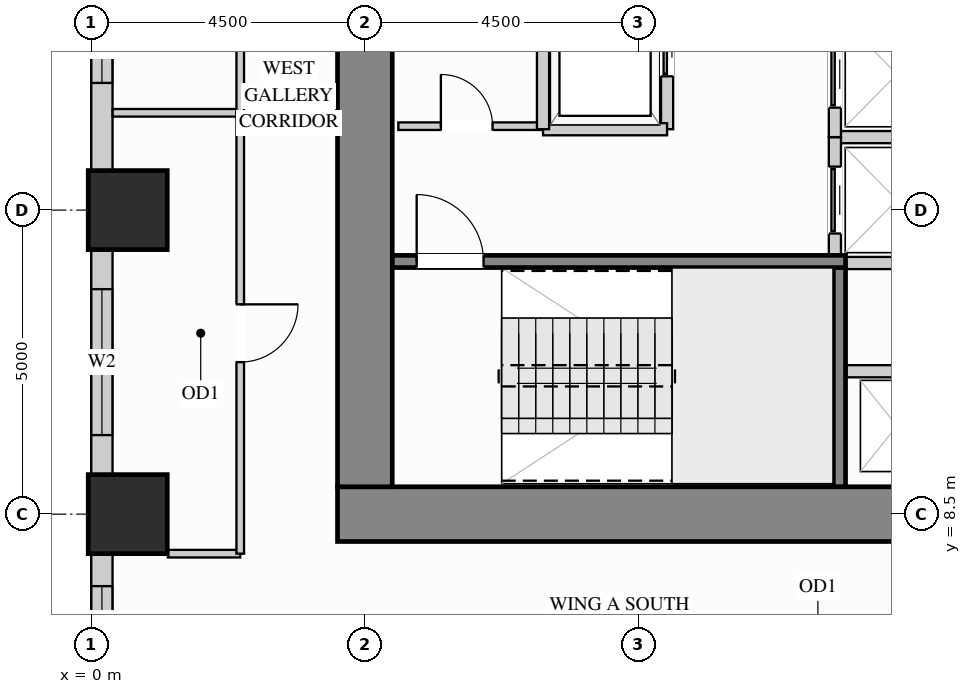
"""IFC4 building model, lengths in metres.
Left out: names, types, materials, properties, quantities, classifications, styles, units other than length and angle.
Written with IfcOpenShell. Run it as: python <this file> out.ifc"""

import sys

from ifc_helpers import new_model, si_unit, direction, frame, frame_2d, origin, origin_2d, place, context, subcontext, project, spatial, rectangle, extrude, source, transform, mapped, element, fill, save


model = new_model("IFC4")
c1 = context("Model", 3, precision=1e-05, world=origin(), true_north=direction((0.0, 1.0)))
c2 = subcontext(c1, "Body", "Model", "MODEL_VIEW")
j1 = project(units=[si_unit("LENGTHUNIT", "METRE"), si_unit("PLANEANGLEUNIT", "RADIAN")], contexts=[c1])
p1 = place(None, origin())
s1 = spatial("IfcSite", under=j1, at=p1, CompositionType="ELEMENT")
p2 = place(p1, origin())
s2 = spatial("IfcBuilding", under=s1, at=p2, CompositionType="ELEMENT")
p3 = place(p2, frame((0.0, 0.0, 58.5)))
s3 = spatial("IfcBuildingStorey", under=s2, at=p3, CompositionType="ELEMENT", Elevation=58.5)
m1 = source(origin(), c2, "Body", "SweptSolid", [
    extrude(rectangle(XDim=1.3, YDim=1.3, at=origin_2d()), origin(), (0.0, 0.0, 1.0), 3.38),
])
for number, where, z_axis, x_axis in (
    (1, (0.6, 13.5, 0.0), (0.0, 0.0, 1.0), (1.0, 0.0, 0.0)),
    (2, (0.6, 8.5, 0.0), (0.0, 0.0, 1.0), (1.0, 0.0, 0.0)),
):
    element("IfcColumn", number, at=place(p3, frame(where, z_axis=z_axis, x_axis=x_axis)), inside=s3, PredefinedType="COLUMN", context=c2, shape_type="MappedRepresentation", body=[
        mapped(m1, transform((0.0, 0.0, 0.0), x_axis=(1.0, 0.0, 0.0), y_axis=(0.0, 1.0, 0.0), z_axis=(0.0, 0.0, 1.0))),
    ])
m2 = source(origin(), c2, "Body", "SweptSolid", [
    extrude(rectangle(XDim=10.9, YDim=0.9, at=frame_2d((5.45, 0.0))), origin(), (0.0, 0.0, 1.0), 3.38),
])
p4 = place(p3, frame((4.05, 8.5, 0.0), z_axis=(0.0, 0.0, 1.0), x_axis=(1.0, 0.0, 0.0)))
e3 = element("IfcWall", 3, at=p4, inside=s3, PredefinedType="SHEAR", context=c2, shape_type="MappedRepresentation", body=[
    mapped(m2, transform((0.0, 0.0, 0.0), x_axis=(1.0, 0.0, 0.0), y_axis=(0.0, 1.0, 0.0), z_axis=(0.0, 0.0, 1.0))),
])
m3 = source(origin(), c2, "Body", "SweptSolid", [
    extrude(rectangle(XDim=20.1, YDim=0.9, at=frame_2d((10.05, 0.0))), origin(), (0.0, 0.0, 1.0), 3.38),
])
p5 = place(p3, frame((4.5, 8.95, 0.0), z_axis=(0.0, 0.0, 1.0), x_axis=(0.0, 1.0, 0.0)))
e4 = element("IfcWall", 4, at=p5, inside=s3, PredefinedType="SHEAR", context=c2, shape_type="MappedRepresentation", body=[
    mapped(m3, transform((0.0, 0.0, 0.0), x_axis=(1.0, 0.0, 0.0), y_axis=(0.0, 1.0, 0.0), z_axis=(0.0, 0.0, 1.0))),
])
p6 = place(p3, frame((0.175, 17.352, 0.0), z_axis=(0.0, 0.0, 1.0), x_axis=(0.0, -1.0, 0.0)))
e5 = element("IfcWall", 5, at=p6, inside=s3, PredefinedType="SOLIDWALL", context=c2, shape_type="SweptSolid", body=[
    extrude(rectangle(XDim=3.204, YDim=0.35, at=frame_2d((1.602, 0.0))), origin(), (0.0, 0.0, 1.0), 2.51),
])
p7 = place(p6, frame((0.561, 0.0, 0.78)))
e6 = element("IfcOpeningElement", 6, at=p7, cuts=e5, PredefinedType="OPENING", context=c2, shape_type="SweptSolid", body=[
    extrude(rectangle(XDim=1.2, YDim=1.55, at=frame_2d((0.6, 0.775))), frame((0.0, 0.185, 0.0), z_axis=(0.0, -1.0, 0.0), x_axis=(1.0, 0.0, 0.0)), (0.0, 0.0, 1.0), 0.37),
])
p8 = place(p3, frame((0.175, 12.852, 0.0), z_axis=(0.0, 0.0, 1.0), x_axis=(0.0, -1.0, 0.0)))
e7 = element("IfcWall", 7, at=p8, inside=s3, PredefinedType="SOLIDWALL", context=c2, shape_type="SweptSolid", body=[
    extrude(rectangle(XDim=3.704, YDim=0.35, at=frame_2d((1.852, 0.0))), origin(), (0.0, 0.0, 1.0), 2.51),
])
p9 = place(p8, frame((0.652, 0.0, 0.78)))
e8 = element("IfcOpeningElement", 8, at=p9, cuts=e7, PredefinedType="OPENING", context=c2, shape_type="SweptSolid", body=[
    extrude(rectangle(XDim=2.4, YDim=1.55, at=frame_2d((1.2, 0.775))), frame((0.0, 0.185, 0.0), z_axis=(0.0, -1.0, 0.0), x_axis=(1.0, 0.0, 0.0)), (0.0, 0.0, 1.0), 0.37),
])
p10 = place(p3, frame((0.175, 7.852, 0.0), z_axis=(0.0, 0.0, 1.0), x_axis=(0.0, -1.0, 0.0)))
e9 = element("IfcWall", 9, at=p10, inside=s3, PredefinedType="SOLIDWALL", context=c2, shape_type="SweptSolid", body=[
    extrude(rectangle(XDim=3.704, YDim=0.35, at=frame_2d((1.852, 0.0))), origin(), (0.0, 0.0, 1.0), 2.51),
])
p11 = place(p10, frame((0.536, 0.0, 0.78)))
e10 = element("IfcOpeningElement", 10, at=p11, cuts=e9, PredefinedType="OPENING", context=c2, shape_type="SweptSolid", body=[
    extrude(rectangle(XDim=1.2, YDim=1.55, at=frame_2d((0.6, 0.775))), frame((0.0, 0.185, 0.0), z_axis=(0.0, -1.0, 0.0), x_axis=(1.0, 0.0, 0.0)), (0.0, 0.0, 1.0), 0.37),
])
p12 = place(p3, frame((5.05, 14.88, 0.0), z_axis=(0.0, 0.0, 1.0), x_axis=(1.0, 0.0, 0.0)))
e11 = element("IfcWall", 11, at=p12, inside=s3, PredefinedType="PARTITIONING", context=c2, shape_type="SweptSolid", body=[
    extrude(rectangle(XDim=2.35, YDim=0.125, at=frame_2d((1.175, 0.0))), origin(), (0.0, 0.0, 1.0), 3.365),
])
p13 = place(p12, frame((0.7, 0.0, 0.0)))
e12 = element("IfcOpeningElement", 12, at=p13, cuts=e11, PredefinedType="OPENING", context=c2, shape_type="SweptSolid", body=[
    extrude(rectangle(XDim=0.85, YDim=2.1, at=frame_2d((0.425, 1.05))), frame((0.0, 0.073, 0.0), z_axis=(0.0, -1.0, 0.0), x_axis=(1.0, 0.0, 0.0)), (0.0, 0.0, 1.0), 0.145),
])
m4 = source(origin(), c2, "Body", "SweptSolid", [
    extrude(rectangle(XDim=1.19, YDim=0.125, at=frame_2d((0.595, 0.0))), origin(), (0.0, 0.0, 1.0), 3.365),
])
p14 = place(p3, frame((1.26, 7.85, 0.0), z_axis=(0.0, 0.0, 1.0), x_axis=(1.0, 0.0, 0.0)))
e13 = element("IfcWall", 13, at=p14, inside=s3, PredefinedType="PARTITIONING", context=c2, shape_type="MappedRepresentation", body=[
    mapped(m4, transform((0.0, 0.0, 0.0), x_axis=(1.0, 0.0, 0.0), y_axis=(0.0, 1.0, 0.0), z_axis=(0.0, 0.0, 1.0))),
])
m5 = source(origin(), c2, "Body", "SweptSolid", [
    extrude(rectangle(XDim=2.098, YDim=0.125, at=frame_2d((1.049, 0.0))), origin(), (0.0, 0.0, 1.0), 3.365),
])
p15 = place(p3, frame((0.352, 15.1, 0.0), z_axis=(0.0, 0.0, 1.0), x_axis=(1.0, 0.0, 0.0)))
e14 = element("IfcWall", 14, at=p15, inside=s3, PredefinedType="PARTITIONING", context=c2, shape_type="MappedRepresentation", body=[
    mapped(m5, transform((0.0, 0.0, 0.0), x_axis=(1.0, 0.0, 0.0), y_axis=(0.0, 1.0, 0.0), z_axis=(0.0, 0.0, 1.0))),
])
p16 = place(p3, frame((2.45, 7.85, 0.0), z_axis=(0.0, 0.0, 1.0), x_axis=(0.0, 1.0, 0.0)))
e15 = element("IfcWall", 15, at=p16, inside=s3, PredefinedType="PARTITIONING", context=c2, shape_type="SweptSolid", body=[
    extrude(rectangle(XDim=7.25, YDim=0.125, at=frame_2d((3.625, 0.0))), origin(), (0.0, 0.0, 1.0), 3.365),
])
p17 = place(p16, frame((3.15, 0.0, 0.0)))
e16 = element("IfcOpeningElement", 16, at=p17, cuts=e15, PredefinedType="OPENING", context=c2, shape_type="SweptSolid", body=[
    extrude(rectangle(XDim=0.95, YDim=2.15, at=frame_2d((0.475, 1.075))), frame((0.0, 0.073, 0.0), z_axis=(0.0, -1.0, 0.0), x_axis=(1.0, 0.0, 0.0)), (0.0, 0.0, 1.0), 0.145),
])
p18 = place(p3, frame((2.45, 15.1, 0.0), z_axis=(0.0, 0.0, 1.0), x_axis=(0.0, 1.0, 0.0)))
e17 = element("IfcWall", 17, at=p18, inside=s3, PredefinedType="PARTITIONING", context=c2, shape_type="SweptSolid", body=[
    extrude(rectangle(XDim=7.5, YDim=0.125, at=frame_2d((3.75, 0.0))), origin(), (0.0, 0.0, 1.0), 3.365),
])
p19 = place(p18, frame((4.1, 0.0, 0.0)))
e18 = element("IfcOpeningElement", 18, at=p19, cuts=e17, PredefinedType="OPENING", context=c2, shape_type="SweptSolid", body=[
    extrude(rectangle(XDim=0.95, YDim=2.15, at=frame_2d((0.475, 1.075))), frame((0.0, 0.073, 0.0), z_axis=(0.0, -1.0, 0.0), x_axis=(1.0, 0.0, 0.0)), (0.0, 0.0, 1.0), 0.145),
])
m6 = source(origin(), c2, "Body", "SweptSolid", [
    extrude(rectangle(XDim=1.6, YDim=0.2, at=frame_2d((0.8, 0.0))), origin(), (0.0, 0.0, 1.0), 3.365),
])
p20 = place(p3, frame((12.42, 10.85, 0.0), z_axis=(0.0, 0.0, 1.0), x_axis=(1.0, 0.0, 0.0)))
e19 = element("IfcWall", 19, at=p20, inside=s3, PredefinedType="PARTITIONING", context=c2, shape_type="MappedRepresentation", body=[
    mapped(m6, transform((0.0, 0.0, 0.0), x_axis=(1.0, 0.0, 0.0), y_axis=(0.0, 1.0, 0.0), z_axis=(0.0, 0.0, 1.0))),
])
m7 = source(origin(), c2, "Body", "SweptSolid", [
    extrude(rectangle(XDim=1.79, YDim=0.2, at=frame_2d((0.895, 0.0))), origin(), (0.0, 0.0, 1.0), 3.365),
])
for number, where, z_axis, x_axis in (
    (20, (12.23, 14.7, 0.0), (0.0, 0.0, 1.0), (1.0, 0.0, 0.0)),
    (21, (12.23, 12.63, 0.0), (0.0, 0.0, 1.0), (1.0, 0.0, 0.0)),
):
    element("IfcWall", number, at=place(p3, frame(where, z_axis=z_axis, x_axis=x_axis)), inside=s3, PredefinedType="PARTITIONING", context=c2, shape_type="MappedRepresentation", body=[
        mapped(m7, transform((0.0, 0.0, 0.0), x_axis=(1.0, 0.0, 0.0), y_axis=(0.0, 1.0, 0.0), z_axis=(0.0, 0.0, 1.0))),
    ])
p21 = place(p3, frame((12.23, 12.63, 0.0), z_axis=(0.0, 0.0, 1.0), x_axis=(0.0, 1.0, 0.0)))
e22 = element("IfcWall", 22, at=p21, inside=s3, PredefinedType="PARTITIONING", context=c2, shape_type="SweptSolid", body=[
    extrude(rectangle(XDim=2.07, YDim=0.2, at=frame_2d((1.035, 0.0))), origin(), (0.0, 0.0, 1.0), 3.365),
])
p22 = place(p21, frame((0.485, 0.0, 0.0)))
e23 = element("IfcOpeningElement", 23, at=p22, cuts=e22, PredefinedType="OPENING", context=c2, shape_type="SweptSolid", body=[
    extrude(rectangle(XDim=1.1, YDim=2.2, at=frame_2d((0.55, 1.1))), frame((0.0, 0.11, 0.0), z_axis=(0.0, -1.0, 0.0), x_axis=(1.0, 0.0, 0.0)), (0.0, 0.0, 1.0), 0.22),
])
p23 = place(p3, frame((12.23, 14.7, 0.0), z_axis=(0.0, 0.0, 1.0), x_axis=(0.0, 1.0, 0.0)))
e24 = element("IfcWall", 24, at=p23, inside=s3, PredefinedType="PARTITIONING", context=c2, shape_type="SweptSolid", body=[
    extrude(rectangle(XDim=2.07, YDim=0.2, at=frame_2d((1.035, 0.0))), origin(), (0.0, 0.0, 1.0), 3.365),
])
p24 = place(p23, frame((0.485, 0.0, 0.0)))
e25 = element("IfcOpeningElement", 25, at=p24, cuts=e24, PredefinedType="OPENING", context=c2, shape_type="SweptSolid", body=[
    extrude(rectangle(XDim=1.1, YDim=2.2, at=frame_2d((0.55, 1.1))), frame((0.0, 0.11, 0.0), z_axis=(0.0, -1.0, 0.0), x_axis=(1.0, 0.0, 0.0)), (0.0, 0.0, 1.0), 0.22),
])
p25 = place(p3, frame((9.47, 14.83, 0.0), z_axis=(0.0, 0.0, 1.0), x_axis=(0.0, 1.0, 0.0)))
e26 = element("IfcWall", 26, at=p25, inside=s3, PredefinedType="PARTITIONING", context=c2, shape_type="SweptSolid", body=[
    extrude(rectangle(XDim=2.84, YDim=0.2, at=frame_2d((1.42, 0.0))), origin(), (0.0, 0.0, 1.0), 3.365),
])
p26 = place(p25, frame((0.87, 0.0, 0.0)))
e27 = element("IfcOpeningElement", 27, at=p26, cuts=e26, PredefinedType="OPENING", context=c2, shape_type="SweptSolid", body=[
    extrude(rectangle(XDim=1.1, YDim=2.2, at=frame_2d((0.55, 1.1))), frame((0.0, 0.11, 0.0), z_axis=(0.0, -1.0, 0.0), x_axis=(1.0, 0.0, 0.0)), (0.0, 0.0, 1.0), 0.22),
])
m8 = source(origin(), c2, "Body", "SweptSolid", [
    extrude(rectangle(XDim=2.04, YDim=0.2, at=frame_2d((1.02, 0.0))), origin(), (0.0, 0.0, 1.0), 3.365),
])
p27 = place(p3, frame((7.43, 14.83, 0.0), z_axis=(0.0, 0.0, 1.0), x_axis=(1.0, 0.0, 0.0)))
e28 = element("IfcWall", 28, at=p27, inside=s3, PredefinedType="PARTITIONING", context=c2, shape_type="MappedRepresentation", body=[
    mapped(m8, transform((0.0, 0.0, 0.0), x_axis=(1.0, 0.0, 0.0), y_axis=(0.0, 1.0, 0.0), z_axis=(0.0, 0.0, 1.0))),
])
m9 = source(origin(), c2, "Body", "SweptSolid", [
    extrude(rectangle(XDim=2.84, YDim=0.2, at=frame_2d((1.42, 0.0))), origin(), (0.0, 0.0, 1.0), 3.365),
])
p28 = place(p3, frame((7.43, 14.83, 0.0), z_axis=(0.0, 0.0, 1.0), x_axis=(0.0, 1.0, 0.0)))
e29 = element("IfcWall", 29, at=p28, inside=s3, PredefinedType="PARTITIONING", context=c2, shape_type="MappedRepresentation", body=[
    mapped(m9, transform((0.0, 0.0, 0.0), x_axis=(1.0, 0.0, 0.0), y_axis=(0.0, 1.0, 0.0), z_axis=(0.0, 0.0, 1.0))),
])
m10 = source(origin(), c2, "Body", "SweptSolid", [
    extrude(rectangle(XDim=3.603, YDim=0.2, at=frame_2d((1.802, 0.0))), origin(), (0.0, 0.0, 1.0), 3.38),
])
p29 = place(p3, frame((12.305, 8.952, 0.0), z_axis=(0.0, 0.0, 1.0), x_axis=(0.0, 1.0, 0.0)))
e30 = element("IfcWall", 30, at=p29, inside=s3, PredefinedType="SHEAR", context=c2, shape_type="MappedRepresentation", body=[
    mapped(m10, transform((0.0, 0.0, 0.0), x_axis=(1.0, 0.0, 0.0), y_axis=(0.0, 1.0, 0.0), z_axis=(0.0, 0.0, 1.0))),
])
p30 = place(p3, frame((4.952, 12.655, 0.0), z_axis=(0.0, 0.0, 1.0), x_axis=(1.0, 0.0, 0.0)))
e31 = element("IfcWall", 31, at=p30, inside=s3, PredefinedType="SHEAR", context=c2, shape_type="SweptSolid", body=[
    extrude(rectangle(XDim=7.453, YDim=0.2, at=frame_2d((3.727, 0.0))), origin(), (0.0, 0.0, 1.0), 3.38),
])
p31 = place(p30, frame((0.4, 0.0, 0.0)))
e32 = element("IfcOpeningElement", 32, at=p31, cuts=e31, PredefinedType="OPENING", context=c2, shape_type="SweptSolid", body=[
    extrude(rectangle(XDim=1.1, YDim=2.15, at=frame_2d((0.55, 1.075))), frame((0.0, 0.11, 0.0), z_axis=(0.0, -1.0, 0.0), x_axis=(1.0, 0.0, 0.0)), (0.0, 0.0, 1.0), 0.22),
])
m11 = source(origin(), c2, "Body", "SweptSolid", [
    extrude(rectangle(XDim=1.1, YDim=2.2, at=frame_2d((0.55, 1.1))), frame((0.0, 0.025, 0.0), z_axis=(0.0, -1.0, 0.0), x_axis=(1.0, 0.0, 0.0)), (0.0, 0.0, 1.0), 0.05),
])
p32 = place(p22, origin())
e33 = element("IfcDoor", 33, at=p32, inside=s3, OperationType="SLIDING_TO_LEFT", PredefinedType="DOOR", context=c2, shape_type="MappedRepresentation", body=[
    mapped(m11, transform((0.0, 0.0, 0.0), x_axis=(1.0, 0.0, 0.0), y_axis=(0.0, 1.0, 0.0), z_axis=(0.0, 0.0, 1.0))),
])
fill(e23, e33)
p33 = place(p24, origin())
e34 = element("IfcDoor", 34, at=p33, inside=s3, OperationType="SLIDING_TO_LEFT", PredefinedType="DOOR", context=c2, shape_type="MappedRepresentation", body=[
    mapped(m11, transform((0.0, 0.0, 0.0), x_axis=(1.0, 0.0, 0.0), y_axis=(0.0, 1.0, 0.0), z_axis=(0.0, 0.0, 1.0))),
])
fill(e25, e34)
p34 = place(p26, origin())
e35 = element("IfcDoor", 35, at=p34, inside=s3, OperationType="SLIDING_TO_LEFT", PredefinedType="DOOR", context=c2, shape_type="MappedRepresentation", body=[
    mapped(m11, transform((0.0, 0.0, 0.0), x_axis=(1.0, 0.0, 0.0), y_axis=(0.0, 1.0, 0.0), z_axis=(0.0, 0.0, 1.0))),
])
fill(e27, e35)
m12 = source(origin(), c2, "Body", "SweptSolid", [
    extrude(rectangle(XDim=0.95, YDim=2.15, at=frame_2d((0.475, 1.075))), frame((0.0, 0.025, 0.0), z_axis=(0.0, -1.0, 0.0), x_axis=(1.0, 0.0, 0.0)), (0.0, 0.0, 1.0), 0.05),
])
p35 = place(p17, origin())
e36 = element("IfcDoor", 36, at=p35, inside=s3, OperationType="SINGLE_SWING_RIGHT", PredefinedType="DOOR", context=c2, shape_type="MappedRepresentation", body=[
    mapped(m12, transform((0.0, 0.0, 0.0), x_axis=(1.0, 0.0, 0.0), y_axis=(0.0, 1.0, 0.0), z_axis=(0.0, 0.0, 1.0))),
])
fill(e16, e36)
m13 = source(origin(), c2, "Body", "SweptSolid", [
    extrude(rectangle(XDim=0.85, YDim=2.1, at=frame_2d((0.425, 1.05))), frame((0.0, 0.025, 0.0), z_axis=(0.0, -1.0, 0.0), x_axis=(1.0, 0.0, 0.0)), (0.0, 0.0, 1.0), 0.05),
])
p36 = place(p13, origin())
e37 = element("IfcDoor", 37, at=p36, inside=s3, OperationType="SINGLE_SWING_LEFT", PredefinedType="DOOR", context=c2, shape_type="MappedRepresentation", body=[
    mapped(m13, transform((0.0, 0.0, 0.0), x_axis=(1.0, 0.0, 0.0), y_axis=(0.0, 1.0, 0.0), z_axis=(0.0, 0.0, 1.0))),
])
fill(e12, e37)
m14 = source(origin(), c2, "Body", "SweptSolid", [
    extrude(rectangle(XDim=1.1, YDim=2.15, at=frame_2d((0.55, 1.075))), frame((0.0, 0.025, 0.0), z_axis=(0.0, -1.0, 0.0), x_axis=(1.0, 0.0, 0.0)), (0.0, 0.0, 1.0), 0.05),
])
p37 = place(p31, origin())
e38 = element("IfcDoor", 38, at=p37, inside=s3, OperationType="SINGLE_SWING_LEFT", PredefinedType="DOOR", context=c2, shape_type="MappedRepresentation", body=[
    mapped(m14, transform((0.0, 0.0, 0.0), x_axis=(1.0, 0.0, 0.0), y_axis=(0.0, 1.0, 0.0), z_axis=(0.0, 0.0, 1.0))),
])
fill(e32, e38)
m15 = source(origin(), c2, "Body", "SweptSolid", [
    extrude(rectangle(XDim=2.4, YDim=1.55, at=frame_2d((1.2, 0.775))), frame((0.0, 0.03, 0.0), z_axis=(0.0, -1.0, 0.0), x_axis=(1.0, 0.0, 0.0)), (0.0, 0.0, 1.0), 0.06),
])
p38 = place(p9, origin())
e39 = element("IfcWindow", 39, at=p38, inside=s3, PartitioningType="SINGLE_PANEL", PredefinedType="WINDOW", context=c2, shape_type="MappedRepresentation", body=[
    mapped(m15, transform((0.0, 0.0, 0.0), x_axis=(1.0, 0.0, 0.0), y_axis=(0.0, 1.0, 0.0), z_axis=(0.0, 0.0, 1.0))),
])
fill(e8, e39)
m16 = source(origin(), c2, "Body", "SweptSolid", [
    extrude(rectangle(XDim=1.2, YDim=1.55, at=frame_2d((0.6, 0.775))), frame((0.0, 0.03, 0.0), z_axis=(0.0, -1.0, 0.0), x_axis=(1.0, 0.0, 0.0)), (0.0, 0.0, 1.0), 0.06),
])
p39 = place(p7, origin())
e40 = element("IfcWindow", 40, at=p39, inside=s3, PartitioningType="SINGLE_PANEL", PredefinedType="WINDOW", context=c2, shape_type="MappedRepresentation", body=[
    mapped(m16, transform((0.0, 0.0, 0.0), x_axis=(1.0, 0.0, 0.0), y_axis=(0.0, 1.0, 0.0), z_axis=(0.0, 0.0, 1.0))),
])
fill(e6, e40)
p40 = place(p11, origin())
e41 = element("IfcWindow", 41, at=p40, inside=s3, PartitioningType="SINGLE_PANEL", PredefinedType="WINDOW", context=c2, shape_type="MappedRepresentation", body=[
    mapped(m16, transform((0.0, 0.0, 0.0), x_axis=(1.0, 0.0, 0.0), y_axis=(0.0, 1.0, 0.0), z_axis=(0.0, 0.0, 1.0))),
])
fill(e10, e41)
save(model, sys.argv[1])
